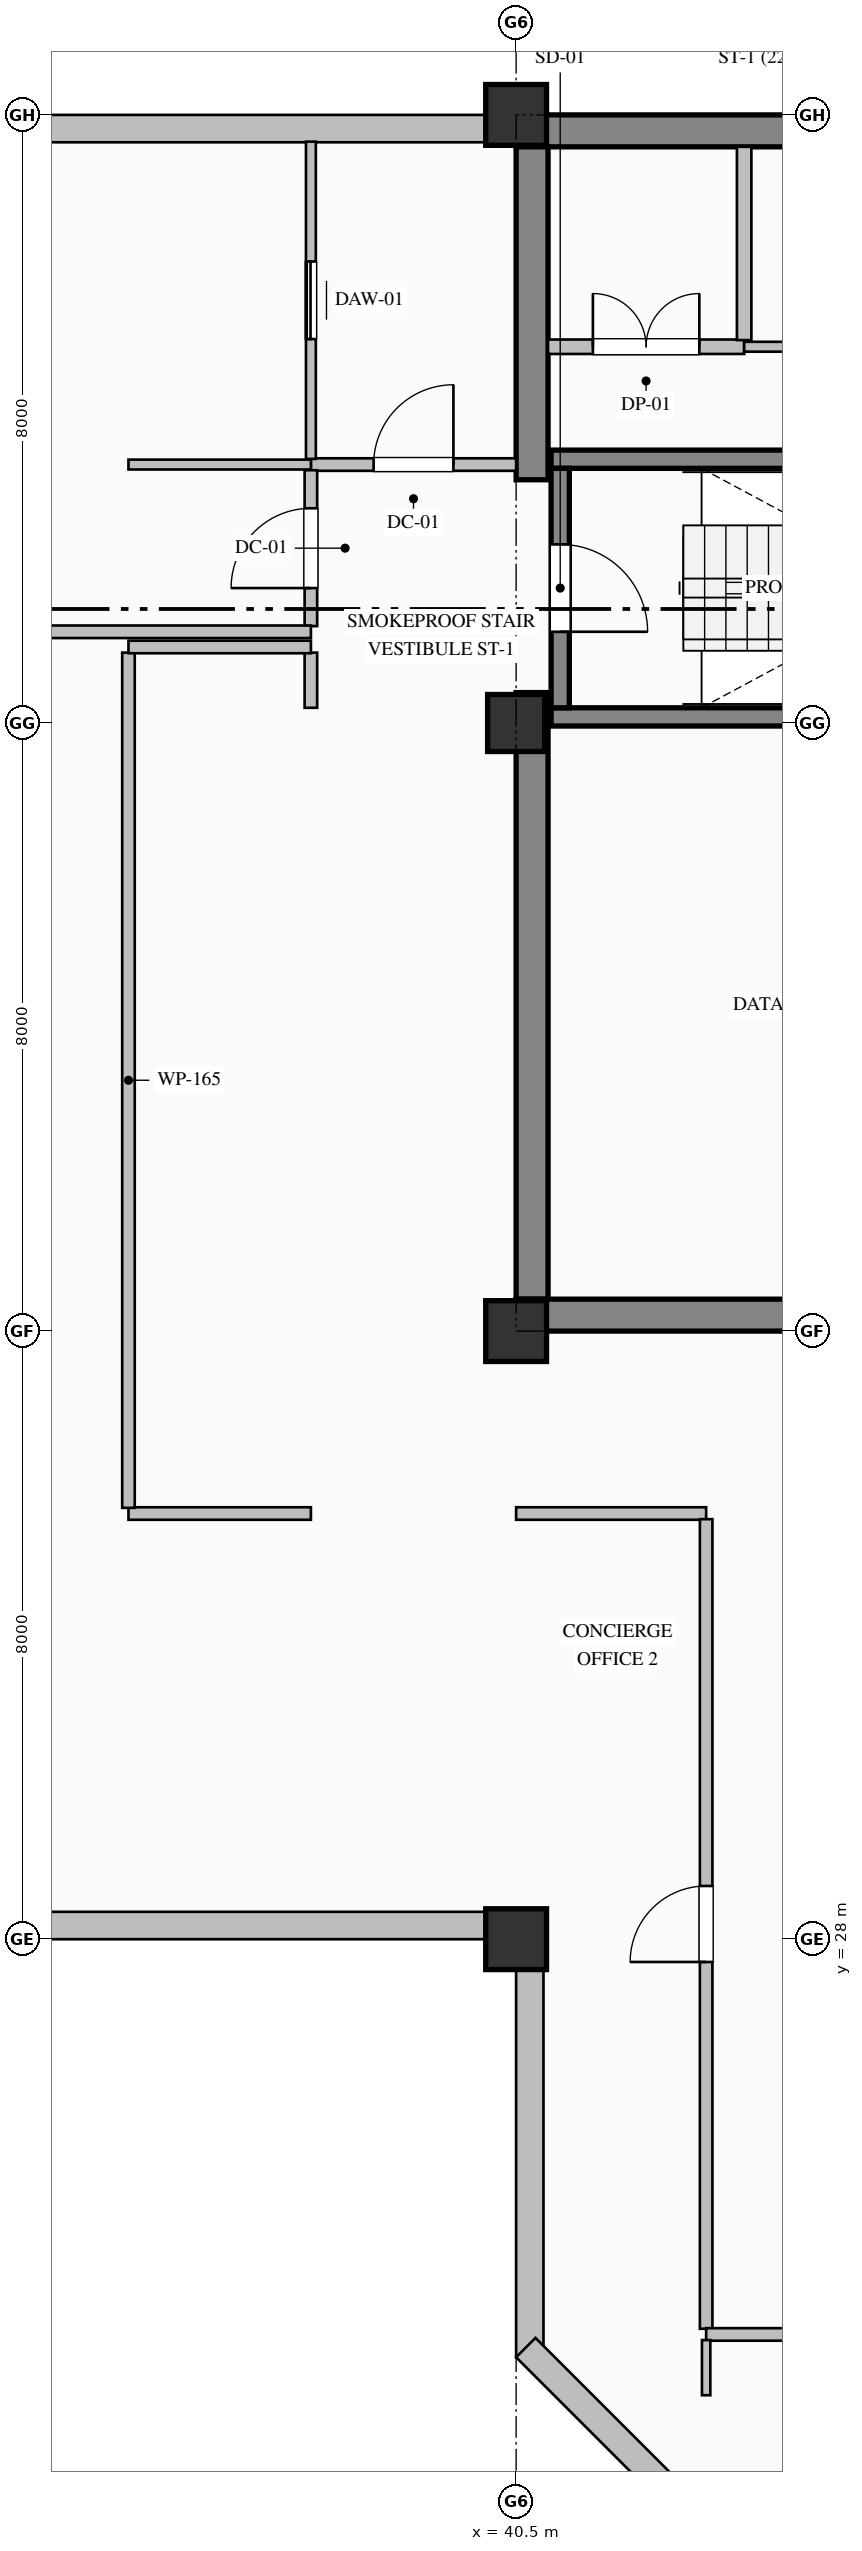
"""IFC4 building model, lengths in metres.
Left out: names, types, materials, properties, quantities, classifications, styles, units other than length and angle.
Written with IfcOpenShell. Run it as: python <this file> out.ifc"""

import sys

from ifc_helpers import new_model, si_unit, direction, frame, frame_2d, origin, origin_2d, place, context, subcontext, project, spatial, rectangle, hollow_rectangle, extrude, element, fill, save


model = new_model("IFC4")
c1 = context("Model", 3, precision=1e-05, world=origin(), true_north=direction((0.0, 1.0)))
c2 = subcontext(c1, "Body", "Model", "MODEL_VIEW")
j1 = project(units=[si_unit("LENGTHUNIT", "METRE"), si_unit("PLANEANGLEUNIT", "RADIAN")], contexts=[c1])
p1 = place(None, origin())
s1 = spatial("IfcSite", under=j1, at=p1, CompositionType="ELEMENT")
p2 = place(p1, origin())
s2 = spatial("IfcBuilding", under=s1, at=p2, CompositionType="ELEMENT")
p3 = place(p2, frame((0.0, 0.0, 327.2)))
s3 = spatial("IfcBuildingStorey", under=s2, at=p3, CompositionType="ELEMENT", Elevation=327.2)
p4 = place(p3, frame((40.5, 51.79, 0.0), z_axis=(0.0, 0.0, 1.0), x_axis=(1.0, 0.0, 0.0)))
e1 = element("IfcWall", 1, at=p4, inside=s3, PredefinedType="SHEAR", context=c2, shape_type="SweptSolid", body=[
    extrude(rectangle(XDim=23.5, YDim=0.42, at=frame_2d((11.75, 0.0))), origin(), (0.0, 0.0, 1.0), 3.785),
])
p5 = place(p3, frame((40.71, 36.42, 0.0), z_axis=(0.0, 0.0, 1.0), x_axis=(0.0, 1.0, 0.0)))
e2 = element("IfcWall", 2, at=p5, inside=s3, PredefinedType="SHEAR", context=c2, shape_type="SweptSolid", body=[
    extrude(rectangle(XDim=7.98, YDim=0.42, at=frame_2d((3.99, 0.0))), origin(), (0.0, 0.0, 1.0), 3.785),
])
p6 = place(p3, frame((40.71, 47.2, 0.0), z_axis=(0.0, 0.0, 1.0), x_axis=(0.0, 1.0, 0.0)))
e3 = element("IfcWall", 3, at=p6, inside=s3, PredefinedType="SHEAR", context=c2, shape_type="SweptSolid", body=[
    extrude(rectangle(XDim=4.38, YDim=0.42, at=frame_2d((2.19, 0.0))), origin(), (0.0, 0.0, 1.0), 3.785),
])
p7 = place(p3, frame((40.5, 36.21, 0.0), z_axis=(0.0, 0.0, 1.0), x_axis=(1.0, 0.0, 0.0)))
e4 = element("IfcWall", 4, at=p7, inside=s3, PredefinedType="SHEAR", context=c2, shape_type="SweptSolid", body=[
    extrude(rectangle(XDim=9.1, YDim=0.42, at=frame_2d((4.55, 0.0))), origin(), (0.0, 0.0, 1.0), 3.785),
])
for number, where, z_axis, x_axis in (
    (5, (40.5, 28.0, 0.0), (0.0, 0.0, 1.0), (1.0, 0.0, 0.0)),
    (6, (40.5, 36.0, 0.0), (0.0, 0.0, 1.0), (1.0, 0.0, 0.0)),
):
    element("IfcColumn", number, at=place(p3, frame(where, z_axis=z_axis, x_axis=x_axis)), inside=s3, PredefinedType="COLUMN", context=c2, shape_type="SweptSolid", body=[
        extrude(hollow_rectangle(XDim=0.8, YDim=0.8, WallThickness=0.032, at=origin_2d()), origin(), (0.0, 0.0, 1.0), 4.0),
    ])
p8 = place(p3, frame((40.5, 44.0, 0.0), z_axis=(0.0, 0.0, 1.0), x_axis=(1.0, 0.0, 0.0)))
e7 = element("IfcColumn", 7, at=p8, inside=s3, PredefinedType="COLUMN", context=c2, shape_type="SweptSolid", body=[
    extrude(rectangle(XDim=0.75, YDim=0.75, at=origin_2d()), origin(), (0.0, 0.0, 1.0), 4.0),
])
p9 = place(p3, frame((40.5, 52.0, 0.0), z_axis=(0.0, 0.0, 1.0), x_axis=(1.0, 0.0, 0.0)))
e8 = element("IfcColumn", 8, at=p9, inside=s3, PredefinedType="COLUMN", context=c2, shape_type="SweptSolid", body=[
    extrude(hollow_rectangle(XDim=0.8, YDim=0.8, WallThickness=0.032, at=origin_2d()), origin(), (0.0, 0.0, 1.0), 4.0),
])
p10 = place(p3, frame((40.68, 22.5, 0.0), z_axis=(0.0, 0.0, 1.0), x_axis=(0.0, 1.0, 0.0)))
e9 = element("IfcWall", 9, at=p10, inside=s3, PredefinedType="SOLIDWALL", context=c2, shape_type="SweptSolid", body=[
    extrude(rectangle(XDim=5.86, YDim=0.36, at=frame_2d((2.93, 0.0))), origin(), (0.0, 0.0, 1.0), 3.185),
])
p11 = place(p3, frame((40.52, 28.18, 0.0), z_axis=(0.0, 0.0, 1.0), x_axis=(-1.0, 0.0, 0.0)))
e10 = element("IfcWall", 10, at=p11, inside=s3, PredefinedType="SOLIDWALL", context=c2, shape_type="SweptSolid", body=[
    extrude(rectangle(XDim=20.02, YDim=0.36, at=frame_2d((10.01, 0.0))), origin(), (0.0, 0.0, 1.0), 3.185),
])
p12 = place(p11, frame((10.275, 0.0, 0.8)))
e11 = element("IfcOpeningElement", 11, at=p12, cuts=e10, PredefinedType="OPENING", context=c2, shape_type="SweptSolid", body=[
    extrude(rectangle(XDim=1.05, YDim=2.15, at=frame_2d((0.525, 1.075))), frame((0.0, 0.19, 0.0), z_axis=(0.0, -1.0, 0.0), x_axis=(1.0, 0.0, 0.0)), (0.0, 0.0, 1.0), 0.38),
])
p13 = place(p11, frame((13.725, 0.0, 0.9)))
e12 = element("IfcOpeningElement", 12, at=p13, cuts=e10, PredefinedType="OPENING", context=c2, shape_type="SweptSolid", body=[
    extrude(rectangle(XDim=1.35, YDim=1.85, at=frame_2d((0.675, 0.925))), frame((0.0, 0.19, 0.0), z_axis=(0.0, -1.0, 0.0), x_axis=(1.0, 0.0, 0.0)), (0.0, 0.0, 1.0), 0.38),
])
p14 = place(p3, frame((20.5, 51.82, 0.0), z_axis=(0.0, 0.0, 1.0), x_axis=(1.0, 0.0, 0.0)))
e13 = element("IfcWall", 13, at=p14, inside=s3, PredefinedType="SOLIDWALL", context=c2, shape_type="SweptSolid", body=[
    extrude(rectangle(XDim=20.02, YDim=0.36, at=frame_2d((10.01, 0.0))), origin(), (0.0, 0.0, 1.0), 3.335),
])
p15 = place(p14, frame((6.675, 0.0, 0.8)))
e14 = element("IfcOpeningElement", 14, at=p15, cuts=e13, PredefinedType="OPENING", context=c2, shape_type="SweptSolid", body=[
    extrude(rectangle(XDim=1.05, YDim=2.15, at=frame_2d((0.525, 1.075))), frame((0.0, 0.19, 0.0), z_axis=(0.0, -1.0, 0.0), x_axis=(1.0, 0.0, 0.0)), (0.0, 0.0, 1.0), 0.38),
])
p16 = place(p3, frame((44.627, 18.627, 0.0), z_axis=(0.0, 0.0, 1.0), x_axis=(-0.707106781187, 0.707106781187, 0.0)))
e15 = element("IfcWall", 15, at=p16, inside=s3, PredefinedType="SOLIDWALL", context=c2, shape_type="SweptSolid", body=[
    extrude(rectangle(XDim=5.657, YDim=0.36, at=frame_2d((2.828, 0.0))), origin(), (0.0, 0.0, 1.0), 3.785),
])
for number, where, z_axis, x_axis in (
    (16, (40.96, 47.47, 0.0), (0.0, 0.0, 1.0), (1.0, 0.0, 0.0)),
    (17, (49.04, 44.08, 0.0), (0.0, 0.0, 1.0), (-1.0, 0.0, 0.0)),
):
    element("IfcWall", number, at=place(p3, frame(where, z_axis=z_axis, x_axis=x_axis)), inside=s3, PredefinedType="SOLIDWALL", context=c2, shape_type="SweptSolid", body=[
        extrude(rectangle(XDim=8.08, YDim=0.24, at=frame_2d((4.04, 0.0))), origin(), (0.0, 0.0, 1.0), 4.0),
    ])
p17 = place(p3, frame((41.08, 47.35, 0.0), z_axis=(0.0, 0.0, 1.0), x_axis=(0.0, -1.0, 0.0)))
e18 = element("IfcWall", 18, at=p17, inside=s3, PredefinedType="SOLIDWALL", context=c2, shape_type="SweptSolid", body=[
    extrude(rectangle(XDim=3.15, YDim=0.24, at=frame_2d((1.575, 0.0))), origin(), (0.0, 0.0, 1.0), 4.0),
])
p18 = place(p17, frame((1.0, 0.0, 0.0)))
e19 = element("IfcOpeningElement", 19, at=p18, cuts=e18, PredefinedType="OPENING", context=c2, shape_type="SweptSolid", body=[
    extrude(rectangle(XDim=1.15, YDim=2.2, at=frame_2d((0.575, 1.1))), frame((0.0, 0.13, 0.0), z_axis=(0.0, -1.0, 0.0), x_axis=(1.0, 0.0, 0.0)), (0.0, 0.0, 1.0), 0.26),
])
p19 = place(p3, frame((37.8, 47.4, 0.0), z_axis=(0.0, 0.0, 1.0), x_axis=(1.0, 0.0, 0.0)))
e20 = element("IfcWall", 20, at=p19, inside=s3, PredefinedType="PARTITIONING", context=c2, shape_type="SweptSolid", body=[
    extrude(rectangle(XDim=2.7, YDim=0.165, at=frame_2d((1.35, 0.0))), origin(), (0.0, 0.0, 1.0), 3.785),
])
p20 = place(p19, frame((0.825, 0.0, 0.0)))
e21 = element("IfcOpeningElement", 21, at=p20, cuts=e20, PredefinedType="OPENING", context=c2, shape_type="SweptSolid", body=[
    extrude(rectangle(XDim=1.05, YDim=2.15, at=frame_2d((0.525, 1.075))), frame((0.0, 0.093, 0.0), z_axis=(0.0, -1.0, 0.0), x_axis=(1.0, 0.0, 0.0)), (0.0, 0.0, 1.0), 0.185),
])
p21 = place(p3, frame((37.8, 45.274, 0.0), z_axis=(0.0, 0.0, 1.0), x_axis=(0.0, 1.0, 0.0)))
e22 = element("IfcWall", 22, at=p21, inside=s3, PredefinedType="PARTITIONING", context=c2, shape_type="SweptSolid", body=[
    extrude(rectangle(XDim=2.051, YDim=0.165, at=frame_2d((1.025, 0.0))), origin(), (0.0, 0.0, 1.0), 3.785),
])
p22 = place(p21, frame((0.5, 0.0, 0.0)))
e23 = element("IfcOpeningElement", 23, at=p22, cuts=e22, PredefinedType="OPENING", context=c2, shape_type="SweptSolid", body=[
    extrude(rectangle(XDim=1.05, YDim=2.15, at=frame_2d((0.525, 1.075))), frame((0.0, 0.093, 0.0), z_axis=(0.0, -1.0, 0.0), x_axis=(1.0, 0.0, 0.0)), (0.0, 0.0, 1.0), 0.185),
])
p23 = place(p3, frame((37.8, 44.2, 0.0), z_axis=(0.0, 0.0, 1.0), x_axis=(0.0, 1.0, 0.0)))
e24 = element("IfcWall", 24, at=p23, inside=s3, PredefinedType="PARTITIONING", context=c2, shape_type="SweptSolid", body=[
    extrude(rectangle(XDim=0.726, YDim=0.165, at=frame_2d((0.363, 0.0))), origin(), (0.0, 0.0, 1.0), 3.785),
])
p24 = place(p3, frame((37.8, 47.475, 0.0), z_axis=(0.0, 0.0, 1.0), x_axis=(0.0, 1.0, 0.0)))
e25 = element("IfcWall", 25, at=p24, inside=s3, PredefinedType="PARTITIONING", context=c2, shape_type="SweptSolid", body=[
    extrude(rectangle(XDim=4.173, YDim=0.13, at=frame_2d((2.087, 0.0))), origin(), (0.0, 0.0, 1.0), 3.785),
])
p25 = place(p24, frame((1.577, 0.0, 0.0)))
e26 = element("IfcOpeningElement", 26, at=p25, cuts=e25, PredefinedType="OPENING", context=c2, shape_type="SweptSolid", body=[
    extrude(rectangle(XDim=1.02, YDim=2.15, at=frame_2d((0.51, 1.075))), frame((0.0, 0.075, 0.0), z_axis=(0.0, -1.0, 0.0), x_axis=(1.0, 0.0, 0.0)), (0.0, 0.0, 1.0), 0.15),
])
p26 = place(p3, frame((37.8, 47.4, 0.0), z_axis=(0.0, 0.0, 1.0), x_axis=(-1.0, 0.0, 0.0)))
e27 = element("IfcWall", 27, at=p26, inside=s3, PredefinedType="PARTITIONING", context=c2, shape_type="SweptSolid", body=[
    extrude(rectangle(XDim=2.4, YDim=0.13, at=frame_2d((1.2, 0.0))), origin(), (0.0, 0.0, 1.0), 3.785),
])
p27 = place(p3, frame((40.92, 48.95, 0.0), z_axis=(0.0, 0.0, 1.0), x_axis=(1.0, 0.0, 0.0)))
e28 = element("IfcWall", 28, at=p27, inside=s3, PredefinedType="PARTITIONING", context=c2, shape_type="SweptSolid", body=[
    extrude(rectangle(XDim=2.58, YDim=0.19, at=frame_2d((1.29, 0.0))), origin(), (0.0, 0.0, 1.0), 3.785),
])
p28 = place(p27, frame((0.59, 0.0, 0.0)))
e29 = element("IfcOpeningElement", 29, at=p28, cuts=e28, PredefinedType="OPENING", context=c2, shape_type="SweptSolid", body=[
    extrude(rectangle(XDim=1.4, YDim=2.25, at=frame_2d((0.7, 1.125))), frame((0.0, 0.105, 0.0), z_axis=(0.0, -1.0, 0.0), x_axis=(1.0, 0.0, 0.0)), (0.0, 0.0, 1.0), 0.21),
])
p29 = place(p3, frame((43.5, 48.95, 0.0), z_axis=(0.0, 0.0, 1.0), x_axis=(1.0, 0.0, 0.0)))
e30 = element("IfcWall", 30, at=p29, inside=s3, PredefinedType="PARTITIONING", context=c2, shape_type="SweptSolid", body=[
    extrude(rectangle(XDim=5.733, YDim=0.13, at=frame_2d((2.866, 0.0))), origin(), (0.0, 0.0, 1.0), 3.785),
])
p30 = place(p29, frame((2.406, 0.0, 0.0)))
e31 = element("IfcOpeningElement", 31, at=p30, cuts=e30, PredefinedType="OPENING", context=c2, shape_type="SweptSolid", body=[
    extrude(rectangle(XDim=0.92, YDim=2.15, at=frame_2d((0.46, 1.075))), frame((0.0, 0.075, 0.0), z_axis=(0.0, -1.0, 0.0), x_axis=(1.0, 0.0, 0.0)), (0.0, 0.0, 1.0), 0.15),
])
p31 = place(p3, frame((43.5, 51.58, 0.0), z_axis=(0.0, 0.0, 1.0), x_axis=(0.0, -1.0, 0.0)))
e32 = element("IfcWall", 32, at=p31, inside=s3, PredefinedType="PARTITIONING", context=c2, shape_type="SweptSolid", body=[
    extrude(rectangle(XDim=2.543, YDim=0.19, at=frame_2d((1.271, 0.0))), origin(), (0.0, 0.0, 1.0), 3.785),
])
p32 = place(p3, frame((37.8, 45.2, 0.0), z_axis=(0.0, 0.0, 1.0), x_axis=(-1.0, 0.0, 0.0)))
e33 = element("IfcWall", 33, at=p32, inside=s3, PredefinedType="PARTITIONING", context=c2, shape_type="SweptSolid", body=[
    extrude(rectangle(XDim=13.3, YDim=0.165, at=frame_2d((6.65, 0.0))), origin(), (0.0, 0.0, 1.0), 3.785),
])
p33 = place(p32, frame((6.15, 0.0, 0.0)))
e34 = element("IfcOpeningElement", 34, at=p33, cuts=e33, PredefinedType="OPENING", context=c2, shape_type="SweptSolid", body=[
    extrude(rectangle(XDim=1.0, YDim=2.15, at=frame_2d((0.5, 1.075))), frame((0.0, 0.093, 0.0), z_axis=(0.0, -1.0, 0.0), x_axis=(1.0, 0.0, 0.0)), (0.0, 0.0, 1.0), 0.185),
])
p34 = place(p3, frame((37.8, 33.6, 0.0), z_axis=(0.0, 0.0, 1.0), x_axis=(-1.0, 0.0, 0.0)))
e35 = element("IfcWall", 35, at=p34, inside=s3, PredefinedType="PARTITIONING", context=c2, shape_type="SweptSolid", body=[
    extrude(rectangle(XDim=2.4, YDim=0.165, at=frame_2d((1.2, 0.0))), origin(), (0.0, 0.0, 1.0), 3.785),
])
p35 = place(p3, frame((35.4, 33.675, 0.0), z_axis=(0.0, 0.0, 1.0), x_axis=(0.0, 1.0, 0.0)))
e36 = element("IfcWall", 36, at=p35, inside=s3, PredefinedType="PARTITIONING", context=c2, shape_type="SweptSolid", body=[
    extrude(rectangle(XDim=11.251, YDim=0.165, at=frame_2d((5.625, 0.0))), origin(), (0.0, 0.0, 1.0), 3.785),
])
p36 = place(p3, frame((35.4, 45.0, 0.0), z_axis=(0.0, 0.0, 1.0), x_axis=(1.0, 0.0, 0.0)))
e37 = element("IfcWall", 37, at=p36, inside=s3, PredefinedType="PARTITIONING", context=c2, shape_type="SweptSolid", body=[
    extrude(rectangle(XDim=2.4, YDim=0.165, at=frame_2d((1.2, 0.0))), origin(), (0.0, 0.0, 1.0), 3.785),
])
p37 = place(p3, frame((43.0, 33.6, 0.0), z_axis=(0.0, 0.0, 1.0), x_axis=(-1.0, 0.0, 0.0)))
e38 = element("IfcWall", 38, at=p37, inside=s3, PredefinedType="PARTITIONING", context=c2, shape_type="SweptSolid", body=[
    extrude(rectangle(XDim=2.5, YDim=0.165, at=frame_2d((1.25, 0.0))), origin(), (0.0, 0.0, 1.0), 3.785),
])
p38 = place(p3, frame((43.0, 22.875, 0.0), z_axis=(0.0, 0.0, 1.0), x_axis=(0.0, 1.0, 0.0)))
e39 = element("IfcWall", 39, at=p38, inside=s3, PredefinedType="PARTITIONING", context=c2, shape_type="SweptSolid", body=[
    extrude(rectangle(XDim=10.651, YDim=0.165, at=frame_2d((5.325, 0.0))), origin(), (0.0, 0.0, 1.0), 3.785),
])
p39 = place(p38, frame((4.825, 0.0, 0.0)))
e40 = element("IfcOpeningElement", 40, at=p39, cuts=e39, PredefinedType="OPENING", context=c2, shape_type="SweptSolid", body=[
    extrude(rectangle(XDim=1.0, YDim=2.15, at=frame_2d((0.5, 1.075))), frame((0.0, 0.093, 0.0), z_axis=(0.0, -1.0, 0.0), x_axis=(1.0, 0.0, 0.0)), (0.0, 0.0, 1.0), 0.185),
])
p40 = place(p3, frame((45.2, 22.8, 0.0), z_axis=(0.0, 0.0, 1.0), x_axis=(-1.0, 0.0, 0.0)))
e41 = element("IfcWall", 41, at=p40, inside=s3, PredefinedType="PARTITIONING", context=c2, shape_type="SweptSolid", body=[
    extrude(rectangle(XDim=2.2, YDim=0.165, at=frame_2d((1.1, 0.0))), origin(), (0.0, 0.0, 1.0), 3.785),
])
p41 = place(p3, frame((43.0, 22.726, 0.0), z_axis=(0.0, 0.0, 1.0), x_axis=(0.0, -1.0, 0.0)))
e42 = element("IfcWall", 42, at=p41, inside=s3, PredefinedType="MOVABLE", context=c2, shape_type="SweptSolid", body=[
    extrude(rectangle(XDim=0.726, YDim=0.11, at=frame_2d((0.363, 0.0))), origin(), (0.0, 0.0, 1.0), 3.785),
])
p42 = place(p18, origin())
e43 = element("IfcDoor", 43, at=p42, inside=s3, OperationType="SINGLE_SWING_RIGHT", PredefinedType="DOOR", context=c2, shape_type="SweptSolid", body=[
    extrude(rectangle(XDim=1.15, YDim=2.2, at=frame_2d((0.575, 1.1))), frame((0.0, 0.025, 0.0), z_axis=(0.0, -1.0, 0.0), x_axis=(1.0, 0.0, 0.0)), (0.0, 0.0, 1.0), 0.05),
])
fill(e19, e43)
p43 = place(p20, origin())
e44 = element("IfcDoor", 44, at=p43, inside=s3, OperationType="SINGLE_SWING_RIGHT", PredefinedType="DOOR", context=c2, shape_type="SweptSolid", body=[
    extrude(rectangle(XDim=1.05, YDim=2.15, at=frame_2d((0.525, 1.075))), frame((0.0, 0.025, 0.0), z_axis=(0.0, -1.0, 0.0), x_axis=(1.0, 0.0, 0.0)), (0.0, 0.0, 1.0), 0.05),
])
fill(e21, e44)
p44 = place(p22, origin())
e45 = element("IfcDoor", 45, at=p44, inside=s3, OperationType="SINGLE_SWING_LEFT", PredefinedType="DOOR", context=c2, shape_type="SweptSolid", body=[
    extrude(rectangle(XDim=1.05, YDim=2.15, at=frame_2d((0.525, 1.075))), frame((0.0, 0.025, 0.0), z_axis=(0.0, -1.0, 0.0), x_axis=(1.0, 0.0, 0.0)), (0.0, 0.0, 1.0), 0.05),
])
fill(e23, e45)
p45 = place(p25, origin())
e46 = element("IfcDoor", 46, at=p45, inside=s3, OperationType="SLIDING_TO_LEFT", PredefinedType="DOOR", context=c2, shape_type="SweptSolid", body=[
    extrude(rectangle(XDim=1.02, YDim=2.15, at=frame_2d((0.51, 1.075))), frame((0.0, 0.025, 0.0), z_axis=(0.0, -1.0, 0.0), x_axis=(1.0, 0.0, 0.0)), (0.0, 0.0, 1.0), 0.05),
])
fill(e26, e46)
p46 = place(p28, origin())
e47 = element("IfcDoor", 47, at=p46, inside=s3, OperationType="DOUBLE_DOOR_SINGLE_SWING", PredefinedType="DOOR", context=c2, shape_type="SweptSolid", body=[
    extrude(rectangle(XDim=1.4, YDim=2.25, at=frame_2d((0.7, 1.125))), frame((0.0, 0.025, 0.0), z_axis=(0.0, -1.0, 0.0), x_axis=(1.0, 0.0, 0.0)), (0.0, 0.0, 1.0), 0.05),
])
fill(e29, e47)
p47 = place(p39, origin())
e48 = element("IfcDoor", 48, at=p47, inside=s3, OperationType="SINGLE_SWING_LEFT", PredefinedType="DOOR", context=c2, shape_type="SweptSolid", body=[
    extrude(rectangle(XDim=1.0, YDim=2.15, at=frame_2d((0.5, 1.075))), frame((0.0, 0.025, 0.0), z_axis=(0.0, -1.0, 0.0), x_axis=(1.0, 0.0, 0.0)), (0.0, 0.0, 1.0), 0.05),
])
fill(e40, e48)
save(model, sys.argv[1])
